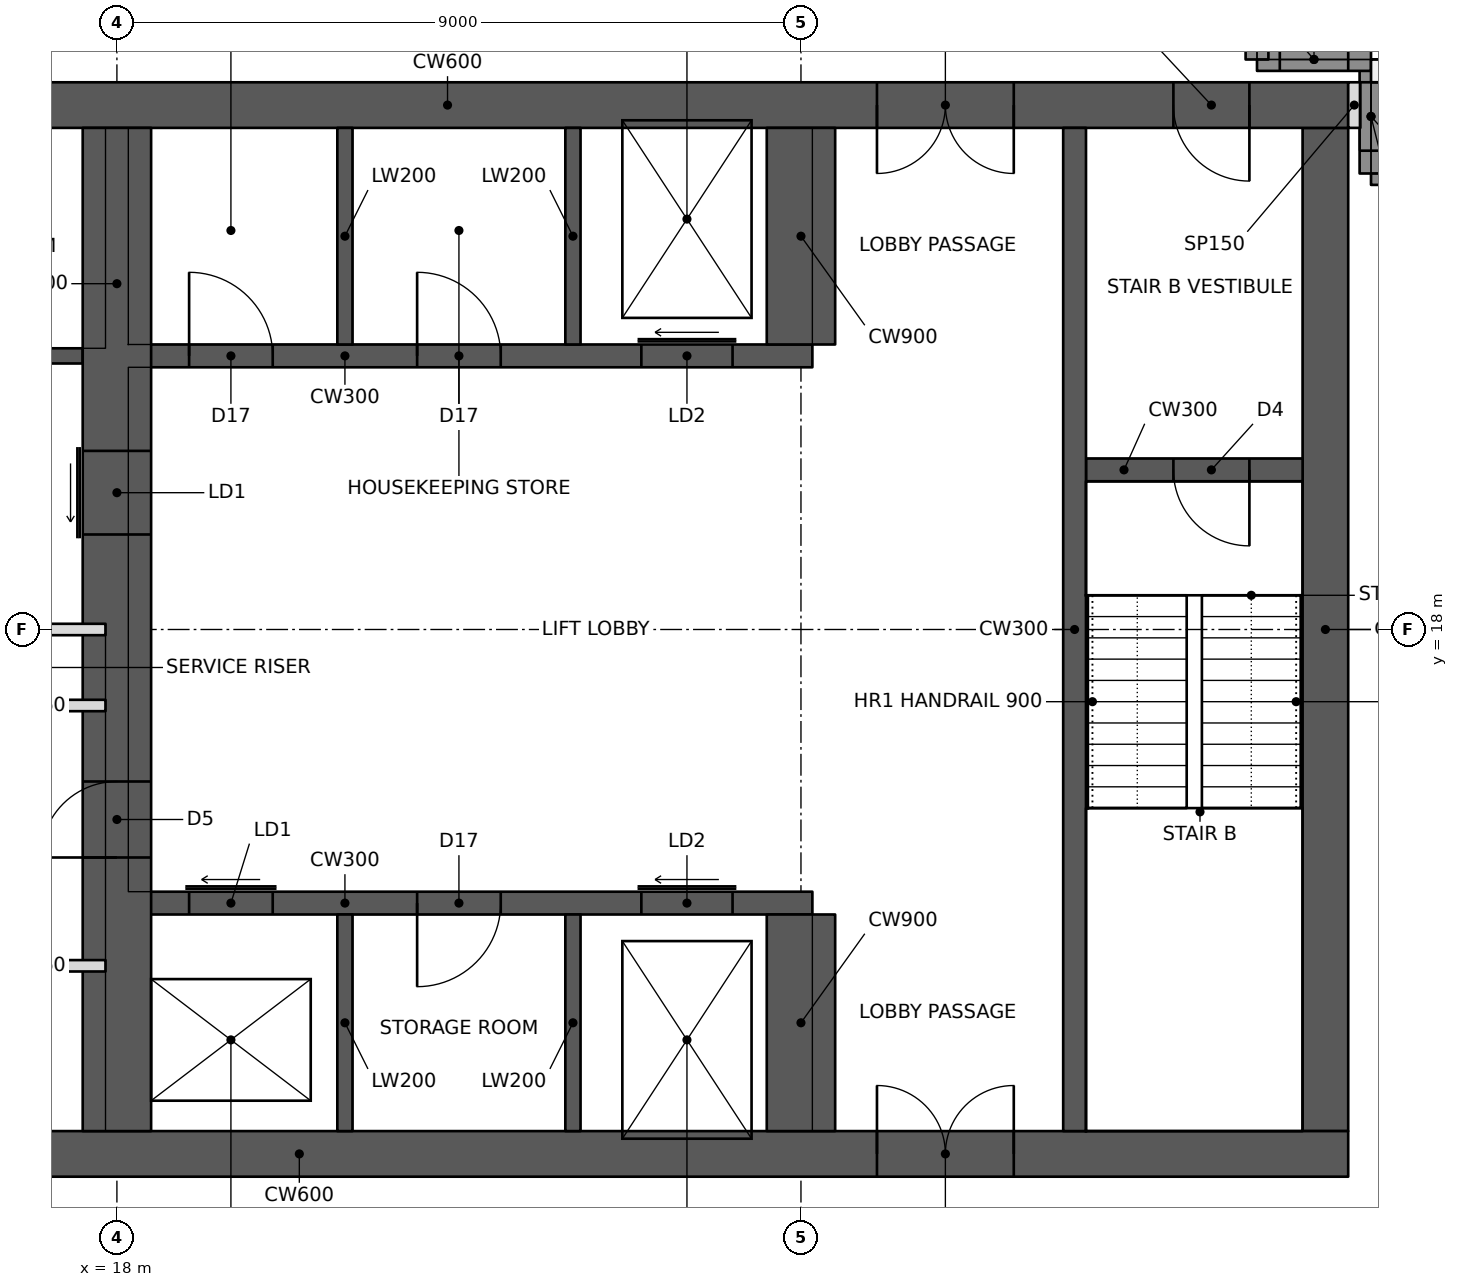
"""IFC4 building model, lengths in metres.
Left out: names, types, materials, properties, quantities, classifications, styles, units other than length and angle.
Written with IfcOpenShell. Run it as: python <this file> out.ifc"""

import sys

from ifc_helpers import new_model, si_unit, direction, frame, frame_2d, origin, place, context, subcontext, project, spatial, rectangle, extrude, element, fill, save


model = new_model("IFC4")
c1 = context("Model", 3, precision=1e-05, world=origin(), true_north=direction((0.0, 1.0)))
c2 = subcontext(c1, "Body", "Model", "MODEL_VIEW")
j1 = project(units=[si_unit("LENGTHUNIT", "METRE"), si_unit("PLANEANGLEUNIT", "RADIAN")], contexts=[c1])
p1 = place(None, origin())
s1 = spatial("IfcSite", under=j1, at=p1, CompositionType="ELEMENT")
p2 = place(p1, origin())
s2 = spatial("IfcBuilding", under=s1, at=p2, CompositionType="ELEMENT")
p3 = place(p2, frame((0.0, 0.0, 226.6)))
s3 = spatial("IfcBuildingStorey", under=s2, at=p3, CompositionType="ELEMENT", Elevation=226.6)
p4 = place(p3, frame((10.8, 11.1, 0.0), z_axis=(0.0, 0.0, 1.0), x_axis=(1.0, 0.0, 0.0)))
e1 = element("IfcWall", 1, at=p4, inside=s3, PredefinedType="SHEAR", context=c2, shape_type="SweptSolid", body=[
    extrude(rectangle(XDim=23.4, YDim=0.6, at=frame_2d((11.7, 0.0))), origin(), (0.0, 0.0, 1.0), 3.6),
])
p5 = place(p4, frame((1.0, 0.0, 0.0)))
e2 = element("IfcOpeningElement", 2, at=p5, cuts=e1, PredefinedType="OPENING", context=c2, shape_type="SweptSolid", body=[
    extrude(rectangle(XDim=1.0, YDim=2.1, at=frame_2d((0.5, 1.05))), frame((0.0, 0.31, 0.0), z_axis=(0.0, -1.0, 0.0), x_axis=(1.0, 0.0, 0.0)), (0.0, 0.0, 1.0), 0.62),
])
p6 = place(p4, frame((17.2, 0.0, 0.0)))
e3 = element("IfcOpeningElement", 3, at=p6, cuts=e1, PredefinedType="OPENING", context=c2, shape_type="SweptSolid", body=[
    extrude(rectangle(XDim=1.8, YDim=2.1, at=frame_2d((0.9, 1.05))), frame((0.0, 0.31, 0.0), z_axis=(0.0, -1.0, 0.0), x_axis=(1.0, 0.0, 0.0)), (0.0, 0.0, 1.0), 0.62),
])
p7 = place(p3, frame((10.8, 24.9, 0.0), z_axis=(0.0, 0.0, 1.0), x_axis=(1.0, 0.0, 0.0)))
e4 = element("IfcWall", 4, at=p7, inside=s3, PredefinedType="SHEAR", context=c2, shape_type="SweptSolid", body=[
    extrude(rectangle(XDim=23.4, YDim=0.6, at=frame_2d((11.7, 0.0))), origin(), (0.0, 0.0, 1.0), 3.6),
])
p8 = place(p7, frame((17.2, 0.0, 0.0)))
e5 = element("IfcOpeningElement", 5, at=p8, cuts=e4, PredefinedType="OPENING", context=c2, shape_type="SweptSolid", body=[
    extrude(rectangle(XDim=1.8, YDim=2.1, at=frame_2d((0.9, 1.05))), frame((0.0, 0.31, 0.0), z_axis=(0.0, -1.0, 0.0), x_axis=(1.0, 0.0, 0.0)), (0.0, 0.0, 1.0), 0.62),
])
p9 = place(p7, frame((21.1, 0.0, 0.0)))
e6 = element("IfcOpeningElement", 6, at=p9, cuts=e4, PredefinedType="OPENING", context=c2, shape_type="SweptSolid", body=[
    extrude(rectangle(XDim=1.0, YDim=2.1, at=frame_2d((0.5, 1.05))), frame((0.0, 0.31, 0.0), z_axis=(0.0, -1.0, 0.0), x_axis=(1.0, 0.0, 0.0)), (0.0, 0.0, 1.0), 0.62),
])
p10 = place(p7, frame((4.9, 0.0, 0.0)))
e7 = element("IfcOpeningElement", 7, at=p10, cuts=e4, PredefinedType="OPENING", context=c2, shape_type="SweptSolid", body=[
    extrude(rectangle(XDim=1.0, YDim=2.1, at=frame_2d((0.5, 1.05))), frame((0.0, 0.31, 0.0), z_axis=(0.0, -1.0, 0.0), x_axis=(1.0, 0.0, 0.0)), (0.0, 0.0, 1.0), 0.62),
])
p11 = place(p3, frame((33.9, 11.4, 0.0), z_axis=(0.0, 0.0, 1.0), x_axis=(0.0, 1.0, 0.0)))
e8 = element("IfcWall", 8, at=p11, inside=s3, PredefinedType="SHEAR", context=c2, shape_type="SweptSolid", body=[
    extrude(rectangle(XDim=13.2, YDim=0.6, at=frame_2d((6.6, 0.0))), origin(), (0.0, 0.0, 1.0), 3.6),
])
p12 = place(p3, frame((18.0, 11.4, 0.0), z_axis=(0.0, 0.0, 1.0), x_axis=(0.0, 1.0, 0.0)))
e9 = element("IfcWall", 9, at=p12, inside=s3, PredefinedType="SHEAR", context=c2, shape_type="SweptSolid", body=[
    extrude(rectangle(XDim=13.2, YDim=0.9, at=frame_2d((6.6, 0.0))), origin(), (0.0, 0.0, 1.0), 3.6),
])
p13 = place(p12, frame((3.6, 0.0, 0.0)))
e10 = element("IfcOpeningElement", 10, at=p13, cuts=e9, PredefinedType="OPENING", context=c2, shape_type="SweptSolid", body=[
    extrude(rectangle(XDim=1.0, YDim=2.1, at=frame_2d((0.5, 1.05))), frame((0.0, 0.46, 0.0), z_axis=(0.0, -1.0, 0.0), x_axis=(1.0, 0.0, 0.0)), (0.0, 0.0, 1.0), 0.92),
])
p14 = place(p12, frame((7.85, 0.0, 0.0)))
e11 = element("IfcOpeningElement", 11, at=p14, cuts=e9, PredefinedType="OPENING", context=c2, shape_type="SweptSolid", body=[
    extrude(rectangle(XDim=1.1, YDim=2.1, at=frame_2d((0.55, 1.05))), frame((0.0, 0.46, 0.0), z_axis=(0.0, -1.0, 0.0), x_axis=(1.0, 0.0, 0.0)), (0.0, 0.0, 1.0), 0.92),
])
p15 = place(p3, frame((14.55, 18.0, 0.0), z_axis=(0.0, 0.0, 1.0), x_axis=(1.0, 0.0, 0.0)))
e12 = element("IfcWall", 12, at=p15, inside=s3, PredefinedType="PARTITIONING", context=c2, shape_type="SweptSolid", body=[
    extrude(rectangle(XDim=3.3, YDim=0.15, at=frame_2d((1.65, 0.0))), origin(), (0.0, 0.0, 1.0), 3.4),
])
p16 = place(p3, frame((18.15, 14.4, 0.0), z_axis=(0.0, 0.0, 1.0), x_axis=(1.0, 0.0, 0.0)))
e13 = element("IfcWall", 13, at=p16, inside=s3, PredefinedType="SHEAR", context=c2, shape_type="SweptSolid", body=[
    extrude(rectangle(XDim=9.0, YDim=0.3, at=frame_2d((4.5, 0.0))), origin(), (0.0, 0.0, 1.0), 3.6),
])
p17 = place(p16, frame((0.8, 0.0, 0.0)))
e14 = element("IfcOpeningElement", 14, at=p17, cuts=e13, PredefinedType="OPENING", context=c2, shape_type="SweptSolid", body=[
    extrude(rectangle(XDim=1.1, YDim=2.1, at=frame_2d((0.55, 1.05))), frame((0.0, 0.16, 0.0), z_axis=(0.0, -1.0, 0.0), x_axis=(1.0, 0.0, 0.0)), (0.0, 0.0, 1.0), 0.32),
])
p18 = place(p16, frame((6.75, 0.0, 0.0)))
e15 = element("IfcOpeningElement", 15, at=p18, cuts=e13, PredefinedType="OPENING", context=c2, shape_type="SweptSolid", body=[
    extrude(rectangle(XDim=1.2, YDim=2.1, at=frame_2d((0.6, 1.05))), frame((0.0, 0.16, 0.0), z_axis=(0.0, -1.0, 0.0), x_axis=(1.0, 0.0, 0.0)), (0.0, 0.0, 1.0), 0.32),
])
p19 = place(p16, frame((3.8, 0.0, 0.0)))
e16 = element("IfcOpeningElement", 16, at=p19, cuts=e13, PredefinedType="OPENING", context=c2, shape_type="SweptSolid", body=[
    extrude(rectangle(XDim=1.1, YDim=2.1, at=frame_2d((0.55, 1.05))), frame((0.0, 0.16, 0.0), z_axis=(0.0, -1.0, 0.0), x_axis=(1.0, 0.0, 0.0)), (0.0, 0.0, 1.0), 0.32),
])
p20 = place(p3, frame((27.0, 11.4, 0.0), z_axis=(0.0, 0.0, 1.0), x_axis=(0.0, 1.0, 0.0)))
e17 = element("IfcWall", 17, at=p20, inside=s3, PredefinedType="SHEAR", context=c2, shape_type="SweptSolid", body=[
    extrude(rectangle(XDim=2.85, YDim=0.9, at=frame_2d((1.425, 0.0))), origin(), (0.0, 0.0, 1.0), 3.6),
])
for number, where, z_axis, x_axis in (
    (18, (21.0, 11.4, 0.0), (0.0, 0.0, 1.0), (0.0, 1.0, 0.0)),
    (19, (24.0, 11.4, 0.0), (0.0, 0.0, 1.0), (0.0, 1.0, 0.0)),
):
    element("IfcWall", number, at=place(p3, frame(where, z_axis=z_axis, x_axis=x_axis)), inside=s3, PredefinedType="SHEAR", context=c2, shape_type="SweptSolid", body=[
        extrude(rectangle(XDim=2.85, YDim=0.2, at=frame_2d((1.425, 0.0))), origin(), (0.0, 0.0, 1.0), 3.6),
    ])
p21 = place(p3, frame((18.15, 21.6, 0.0), z_axis=(0.0, 0.0, 1.0), x_axis=(1.0, 0.0, 0.0)))
e20 = element("IfcWall", 20, at=p21, inside=s3, PredefinedType="SHEAR", context=c2, shape_type="SweptSolid", body=[
    extrude(rectangle(XDim=9.0, YDim=0.3, at=frame_2d((4.5, 0.0))), origin(), (0.0, 0.0, 1.0), 3.6),
])
p22 = place(p21, frame((6.75, 0.0, 0.0)))
e21 = element("IfcOpeningElement", 21, at=p22, cuts=e20, PredefinedType="OPENING", context=c2, shape_type="SweptSolid", body=[
    extrude(rectangle(XDim=1.2, YDim=2.1, at=frame_2d((0.6, 1.05))), frame((0.0, 0.16, 0.0), z_axis=(0.0, -1.0, 0.0), x_axis=(1.0, 0.0, 0.0)), (0.0, 0.0, 1.0), 0.32),
])
p23 = place(p21, frame((0.8, 0.0, 0.0)))
e22 = element("IfcOpeningElement", 22, at=p23, cuts=e20, PredefinedType="OPENING", context=c2, shape_type="SweptSolid", body=[
    extrude(rectangle(XDim=1.1, YDim=2.1, at=frame_2d((0.55, 1.05))), frame((0.0, 0.16, 0.0), z_axis=(0.0, -1.0, 0.0), x_axis=(1.0, 0.0, 0.0)), (0.0, 0.0, 1.0), 0.32),
])
p24 = place(p21, frame((3.8, 0.0, 0.0)))
e23 = element("IfcOpeningElement", 23, at=p24, cuts=e20, PredefinedType="OPENING", context=c2, shape_type="SweptSolid", body=[
    extrude(rectangle(XDim=1.1, YDim=2.1, at=frame_2d((0.55, 1.05))), frame((0.0, 0.16, 0.0), z_axis=(0.0, -1.0, 0.0), x_axis=(1.0, 0.0, 0.0)), (0.0, 0.0, 1.0), 0.32),
])
p25 = place(p3, frame((27.0, 21.75, 0.0), z_axis=(0.0, 0.0, 1.0), x_axis=(0.0, 1.0, 0.0)))
e24 = element("IfcWall", 24, at=p25, inside=s3, PredefinedType="SHEAR", context=c2, shape_type="SweptSolid", body=[
    extrude(rectangle(XDim=2.85, YDim=0.9, at=frame_2d((1.425, 0.0))), origin(), (0.0, 0.0, 1.0), 3.6),
])
for number, where, z_axis, x_axis in (
    (25, (21.0, 21.75, 0.0), (0.0, 0.0, 1.0), (0.0, 1.0, 0.0)),
    (26, (24.0, 21.75, 0.0), (0.0, 0.0, 1.0), (0.0, 1.0, 0.0)),
):
    element("IfcWall", number, at=place(p3, frame(where, z_axis=z_axis, x_axis=x_axis)), inside=s3, PredefinedType="SHEAR", context=c2, shape_type="SweptSolid", body=[
        extrude(rectangle(XDim=2.85, YDim=0.2, at=frame_2d((1.425, 0.0))), origin(), (0.0, 0.0, 1.0), 3.6),
    ])
p26 = place(p3, frame((30.6, 11.4, 0.0), z_axis=(0.0, 0.0, 1.0), x_axis=(0.0, 1.0, 0.0)))
e27 = element("IfcWall", 27, at=p26, inside=s3, PredefinedType="SHEAR", context=c2, shape_type="SweptSolid", body=[
    extrude(rectangle(XDim=13.2, YDim=0.3, at=frame_2d((6.6, 0.0))), origin(), (0.0, 0.0, 1.0), 3.6),
])
p27 = place(p3, frame((30.75, 20.1, 0.0), z_axis=(0.0, 0.0, 1.0), x_axis=(1.0, 0.0, 0.0)))
e28 = element("IfcWall", 28, at=p27, inside=s3, PredefinedType="SHEAR", context=c2, shape_type="SweptSolid", body=[
    extrude(rectangle(XDim=2.85, YDim=0.3, at=frame_2d((1.425, 0.0))), origin(), (0.0, 0.0, 1.0), 3.6),
])
p28 = place(p27, frame((1.15, 0.0, 0.0)))
e29 = element("IfcOpeningElement", 29, at=p28, cuts=e28, PredefinedType="OPENING", context=c2, shape_type="SweptSolid", body=[
    extrude(rectangle(XDim=1.0, YDim=2.1, at=frame_2d((0.5, 1.05))), frame((0.0, 0.16, 0.0), z_axis=(0.0, -1.0, 0.0), x_axis=(1.0, 0.0, 0.0)), (0.0, 0.0, 1.0), 0.32),
])
p29 = place(p3, frame((14.55, 21.6, 0.0), z_axis=(0.0, 0.0, 1.0), x_axis=(1.0, 0.0, 0.0)))
e30 = element("IfcWall", 30, at=p29, inside=s3, PredefinedType="SHEAR", context=c2, shape_type="SweptSolid", body=[
    extrude(rectangle(XDim=3.0, YDim=0.2, at=frame_2d((1.5, 0.0))), origin(), (0.0, 0.0, 1.0), 3.6),
])
p30 = place(p3, frame((36.0, 24.0, 0.0), z_axis=(0.0, 0.0, 1.0), x_axis=(-1.0, 0.0, 0.0)))
e31 = element("IfcWall", 31, at=p30, inside=s3, PredefinedType="SOLIDWALL", context=c2, shape_type="SweptSolid", body=[
    extrude(rectangle(XDim=1.5, YDim=0.3, at=frame_2d((0.75, 0.0))), origin(), (0.0, 0.0, 1.0), 2.62),
])
p31 = place(p3, frame((34.5, 24.0, 0.0), z_axis=(0.0, 0.0, 1.0), x_axis=(0.0, 1.0, 0.0)))
e32 = element("IfcWall", 32, at=p31, inside=s3, PredefinedType="SOLIDWALL", context=c2, shape_type="SweptSolid", body=[
    extrude(rectangle(XDim=1.5, YDim=0.3, at=frame_2d((0.75, 0.0))), origin(), (0.0, 0.0, 1.0), 3.4),
])
p32 = place(p31, frame((0.3, 0.0, 0.6)))
e33 = element("IfcOpeningElement", 33, at=p32, cuts=e32, PredefinedType="OPENING", context=c2, shape_type="SweptSolid", body=[
    extrude(rectangle(XDim=0.9, YDim=2.2, at=frame_2d((0.45, 1.1))), frame((0.0, 0.16, 0.0), z_axis=(0.0, -1.0, 0.0), x_axis=(1.0, 0.0, 0.0)), (0.0, 0.0, 1.0), 0.32),
])
p33 = place(p3, frame((34.5, 25.5, 0.0), z_axis=(0.0, 0.0, 1.0), x_axis=(-1.0, 0.0, 0.0)))
e34 = element("IfcWall", 34, at=p33, inside=s3, PredefinedType="SOLIDWALL", context=c2, shape_type="SweptSolid", body=[
    extrude(rectangle(XDim=1.5, YDim=0.3, at=frame_2d((0.75, 0.0))), origin(), (0.0, 0.0, 1.0), 3.4),
])
p34 = place(p33, frame((0.3, 0.0, 0.6)))
e35 = element("IfcOpeningElement", 35, at=p34, cuts=e34, PredefinedType="OPENING", context=c2, shape_type="SweptSolid", body=[
    extrude(rectangle(XDim=0.9, YDim=2.2, at=frame_2d((0.45, 1.1))), frame((0.0, 0.16, 0.0), z_axis=(0.0, -1.0, 0.0), x_axis=(1.0, 0.0, 0.0)), (0.0, 0.0, 1.0), 0.32),
])
p35 = place(p3, frame((33.0, 25.5, 0.0), z_axis=(0.0, 0.0, 1.0), x_axis=(0.0, 1.0, 0.0)))
e36 = element("IfcWall", 36, at=p35, inside=s3, PredefinedType="SOLIDWALL", context=c2, shape_type="SweptSolid", body=[
    extrude(rectangle(XDim=1.5, YDim=0.3, at=frame_2d((0.75, 0.0))), origin(), (0.0, 0.0, 1.0), 2.62),
])
p36 = place(p3, frame((34.5, 25.35, 0.0), z_axis=(0.0, 0.0, 1.0), x_axis=(1.0, 0.0, 0.0)))
e37 = element("IfcWall", 37, at=p36, inside=s3, PredefinedType="PARAPET", context=c2, shape_type="SweptSolid", body=[
    extrude(rectangle(XDim=1.5, YDim=0.3, at=frame_2d((0.75, 0.0))), origin(), (0.0, 0.0, 1.0), 1.1),
])
p37 = place(p3, frame((34.2, 24.9, 0.0), z_axis=(0.0, 0.0, 1.0), x_axis=(1.0, 0.0, 0.0)))
e38 = element("IfcWall", 38, at=p37, inside=s3, PredefinedType="PARTITIONING", context=c2, shape_type="SweptSolid", body=[
    extrude(rectangle(XDim=0.16, YDim=0.6, at=frame_2d((0.08, 0.0))), origin(), (0.0, 0.0, 1.0), 3.4),
])
p38 = place(p3, frame((14.55, 17.0, 0.0), z_axis=(0.0, 0.0, 1.0), x_axis=(1.0, 0.0, 0.0)))
e39 = element("IfcWall", 39, at=p38, inside=s3, PredefinedType="PARTITIONING", context=c2, shape_type="SweptSolid", body=[
    extrude(rectangle(XDim=3.3, YDim=0.15, at=frame_2d((1.65, 0.0))), origin(), (0.0, 0.0, 1.0), 3.4),
])
p39 = place(p38, frame((0.3, 0.0, 0.0)))
e40 = element("IfcOpeningElement", 40, at=p39, cuts=e39, PredefinedType="OPENING", context=c2, shape_type="SweptSolid", body=[
    extrude(rectangle(XDim=1.0, YDim=2.1, at=frame_2d((0.5, 1.05))), frame((0.0, 0.085, 0.0), z_axis=(0.0, -1.0, 0.0), x_axis=(1.0, 0.0, 0.0)), (0.0, 0.0, 1.0), 0.17),
])
p40 = place(p3, frame((14.55, 13.575, 0.0), z_axis=(0.0, 0.0, 1.0), x_axis=(1.0, 0.0, 0.0)))
e41 = element("IfcWall", 41, at=p40, inside=s3, PredefinedType="PARTITIONING", context=c2, shape_type="SweptSolid", body=[
    extrude(rectangle(XDim=3.3, YDim=0.15, at=frame_2d((1.65, 0.0))), origin(), (0.0, 0.0, 1.0), 3.4),
])
p41 = place(p40, frame((0.3, 0.0, 0.0)))
e42 = element("IfcOpeningElement", 42, at=p41, cuts=e41, PredefinedType="OPENING", context=c2, shape_type="SweptSolid", body=[
    extrude(rectangle(XDim=1.0, YDim=2.1, at=frame_2d((0.5, 1.05))), frame((0.0, 0.085, 0.0), z_axis=(0.0, -1.0, 0.0), x_axis=(1.0, 0.0, 0.0)), (0.0, 0.0, 1.0), 0.17),
])
p42 = place(p32, origin())
e43 = element("IfcWindow", 43, at=p42, inside=s3, PartitioningType="SINGLE_PANEL", PredefinedType="WINDOW", context=c2, shape_type="SweptSolid", body=[
    extrude(rectangle(XDim=0.9, YDim=2.2, at=frame_2d((0.45, 1.1))), frame((0.0, 0.03, 0.0), z_axis=(0.0, -1.0, 0.0), x_axis=(1.0, 0.0, 0.0)), (0.0, 0.0, 1.0), 0.06),
])
fill(e33, e43)
p43 = place(p34, origin())
e44 = element("IfcWindow", 44, at=p43, inside=s3, PartitioningType="SINGLE_PANEL", PredefinedType="WINDOW", context=c2, shape_type="SweptSolid", body=[
    extrude(rectangle(XDim=0.9, YDim=2.2, at=frame_2d((0.45, 1.1))), frame((0.0, 0.03, 0.0), z_axis=(0.0, -1.0, 0.0), x_axis=(1.0, 0.0, 0.0)), (0.0, 0.0, 1.0), 0.06),
])
fill(e35, e44)
p44 = place(p6, origin())
e45 = element("IfcDoor", 45, at=p44, inside=s3, OperationType="DOUBLE_DOOR_SINGLE_SWING", PredefinedType="DOOR", context=c2, shape_type="SweptSolid", body=[
    extrude(rectangle(XDim=1.8, YDim=2.1, at=frame_2d((0.9, 1.05))), frame((0.0, 0.025, 0.0), z_axis=(0.0, -1.0, 0.0), x_axis=(1.0, 0.0, 0.0)), (0.0, 0.0, 1.0), 0.05),
])
fill(e3, e45)
p45 = place(p8, frame((1.8, 0.0, 0.0), z_axis=(0.0, 0.0, 1.0), x_axis=(-1.0, 0.0, 0.0)))
e46 = element("IfcDoor", 46, at=p45, inside=s3, OperationType="DOUBLE_DOOR_SINGLE_SWING", PredefinedType="DOOR", context=c2, shape_type="SweptSolid", body=[
    extrude(rectangle(XDim=1.8, YDim=2.1, at=frame_2d((0.9, 1.05))), frame((0.0, 0.025, 0.0), z_axis=(0.0, -1.0, 0.0), x_axis=(1.0, 0.0, 0.0)), (0.0, 0.0, 1.0), 0.05),
])
fill(e5, e46)
p46 = place(p9, frame((1.0, 0.0, 0.0), z_axis=(0.0, 0.0, 1.0), x_axis=(-1.0, 0.0, 0.0)))
e47 = element("IfcDoor", 47, at=p46, inside=s3, OperationType="SINGLE_SWING_LEFT", PredefinedType="DOOR", context=c2, shape_type="SweptSolid", body=[
    extrude(rectangle(XDim=1.0, YDim=2.1, at=frame_2d((0.5, 1.05))), frame((0.0, 0.025, 0.0), z_axis=(0.0, -1.0, 0.0), x_axis=(1.0, 0.0, 0.0)), (0.0, 0.0, 1.0), 0.05),
])
fill(e6, e47)
p47 = place(p28, frame((1.0, 0.0, 0.0), z_axis=(0.0, 0.0, 1.0), x_axis=(-1.0, 0.0, 0.0)))
e48 = element("IfcDoor", 48, at=p47, inside=s3, OperationType="SINGLE_SWING_LEFT", PredefinedType="DOOR", context=c2, shape_type="SweptSolid", body=[
    extrude(rectangle(XDim=1.0, YDim=2.1, at=frame_2d((0.5, 1.05))), frame((0.0, 0.025, 0.0), z_axis=(0.0, -1.0, 0.0), x_axis=(1.0, 0.0, 0.0)), (0.0, 0.0, 1.0), 0.05),
])
fill(e29, e48)
p48 = place(p13, origin())
e49 = element("IfcDoor", 49, at=p48, inside=s3, OperationType="SINGLE_SWING_LEFT", PredefinedType="DOOR", context=c2, shape_type="SweptSolid", body=[
    extrude(rectangle(XDim=1.0, YDim=2.1, at=frame_2d((0.5, 1.05))), frame((0.0, 0.025, 0.0), z_axis=(0.0, -1.0, 0.0), x_axis=(1.0, 0.0, 0.0)), (0.0, 0.0, 1.0), 0.05),
])
fill(e10, e49)
p49 = place(p17, origin())
e50 = element("IfcDoor", 50, at=p49, inside=s3, OperationType="SLIDING_TO_LEFT", PredefinedType="DOOR", context=c2, shape_type="SweptSolid", body=[
    extrude(rectangle(XDim=1.1, YDim=2.1, at=frame_2d((0.55, 1.05))), frame((0.0, 0.025, 0.0), z_axis=(0.0, -1.0, 0.0), x_axis=(1.0, 0.0, 0.0)), (0.0, 0.0, 1.0), 0.05),
])
fill(e14, e50)
p50 = place(p14, origin())
e51 = element("IfcDoor", 51, at=p50, inside=s3, OperationType="SLIDING_TO_LEFT", PredefinedType="DOOR", context=c2, shape_type="SweptSolid", body=[
    extrude(rectangle(XDim=1.1, YDim=2.1, at=frame_2d((0.55, 1.05))), frame((0.0, 0.025, 0.0), z_axis=(0.0, -1.0, 0.0), x_axis=(1.0, 0.0, 0.0)), (0.0, 0.0, 1.0), 0.05),
])
fill(e11, e51)
p51 = place(p18, origin())
e52 = element("IfcDoor", 52, at=p51, inside=s3, OperationType="SLIDING_TO_LEFT", PredefinedType="DOOR", context=c2, shape_type="SweptSolid", body=[
    extrude(rectangle(XDim=1.2, YDim=2.1, at=frame_2d((0.6, 1.05))), frame((0.0, 0.025, 0.0), z_axis=(0.0, -1.0, 0.0), x_axis=(1.0, 0.0, 0.0)), (0.0, 0.0, 1.0), 0.05),
])
fill(e15, e52)
p52 = place(p22, origin())
e53 = element("IfcDoor", 53, at=p52, inside=s3, OperationType="SLIDING_TO_LEFT", PredefinedType="DOOR", context=c2, shape_type="SweptSolid", body=[
    extrude(rectangle(XDim=1.2, YDim=2.1, at=frame_2d((0.6, 1.05))), frame((0.0, 0.025, 0.0), z_axis=(0.0, -1.0, 0.0), x_axis=(1.0, 0.0, 0.0)), (0.0, 0.0, 1.0), 0.05),
])
fill(e21, e53)
p53 = place(p23, origin())
e54 = element("IfcDoor", 54, at=p53, inside=s3, OperationType="SINGLE_SWING_LEFT", PredefinedType="DOOR", context=c2, shape_type="SweptSolid", body=[
    extrude(rectangle(XDim=1.1, YDim=2.1, at=frame_2d((0.55, 1.05))), frame((0.0, 0.025, 0.0), z_axis=(0.0, -1.0, 0.0), x_axis=(1.0, 0.0, 0.0)), (0.0, 0.0, 1.0), 0.05),
])
fill(e22, e54)
p54 = place(p24, origin())
e55 = element("IfcDoor", 55, at=p54, inside=s3, OperationType="SINGLE_SWING_LEFT", PredefinedType="DOOR", context=c2, shape_type="SweptSolid", body=[
    extrude(rectangle(XDim=1.1, YDim=2.1, at=frame_2d((0.55, 1.05))), frame((0.0, 0.025, 0.0), z_axis=(0.0, -1.0, 0.0), x_axis=(1.0, 0.0, 0.0)), (0.0, 0.0, 1.0), 0.05),
])
fill(e23, e55)
p55 = place(p19, frame((1.1, 0.0, 0.0), z_axis=(0.0, 0.0, 1.0), x_axis=(-1.0, 0.0, 0.0)))
e56 = element("IfcDoor", 56, at=p55, inside=s3, OperationType="SINGLE_SWING_RIGHT", PredefinedType="DOOR", context=c2, shape_type="SweptSolid", body=[
    extrude(rectangle(XDim=1.1, YDim=2.1, at=frame_2d((0.55, 1.05))), frame((0.0, 0.025, 0.0), z_axis=(0.0, -1.0, 0.0), x_axis=(1.0, 0.0, 0.0)), (0.0, 0.0, 1.0), 0.05),
])
fill(e16, e56)
save(model, sys.argv[1])
